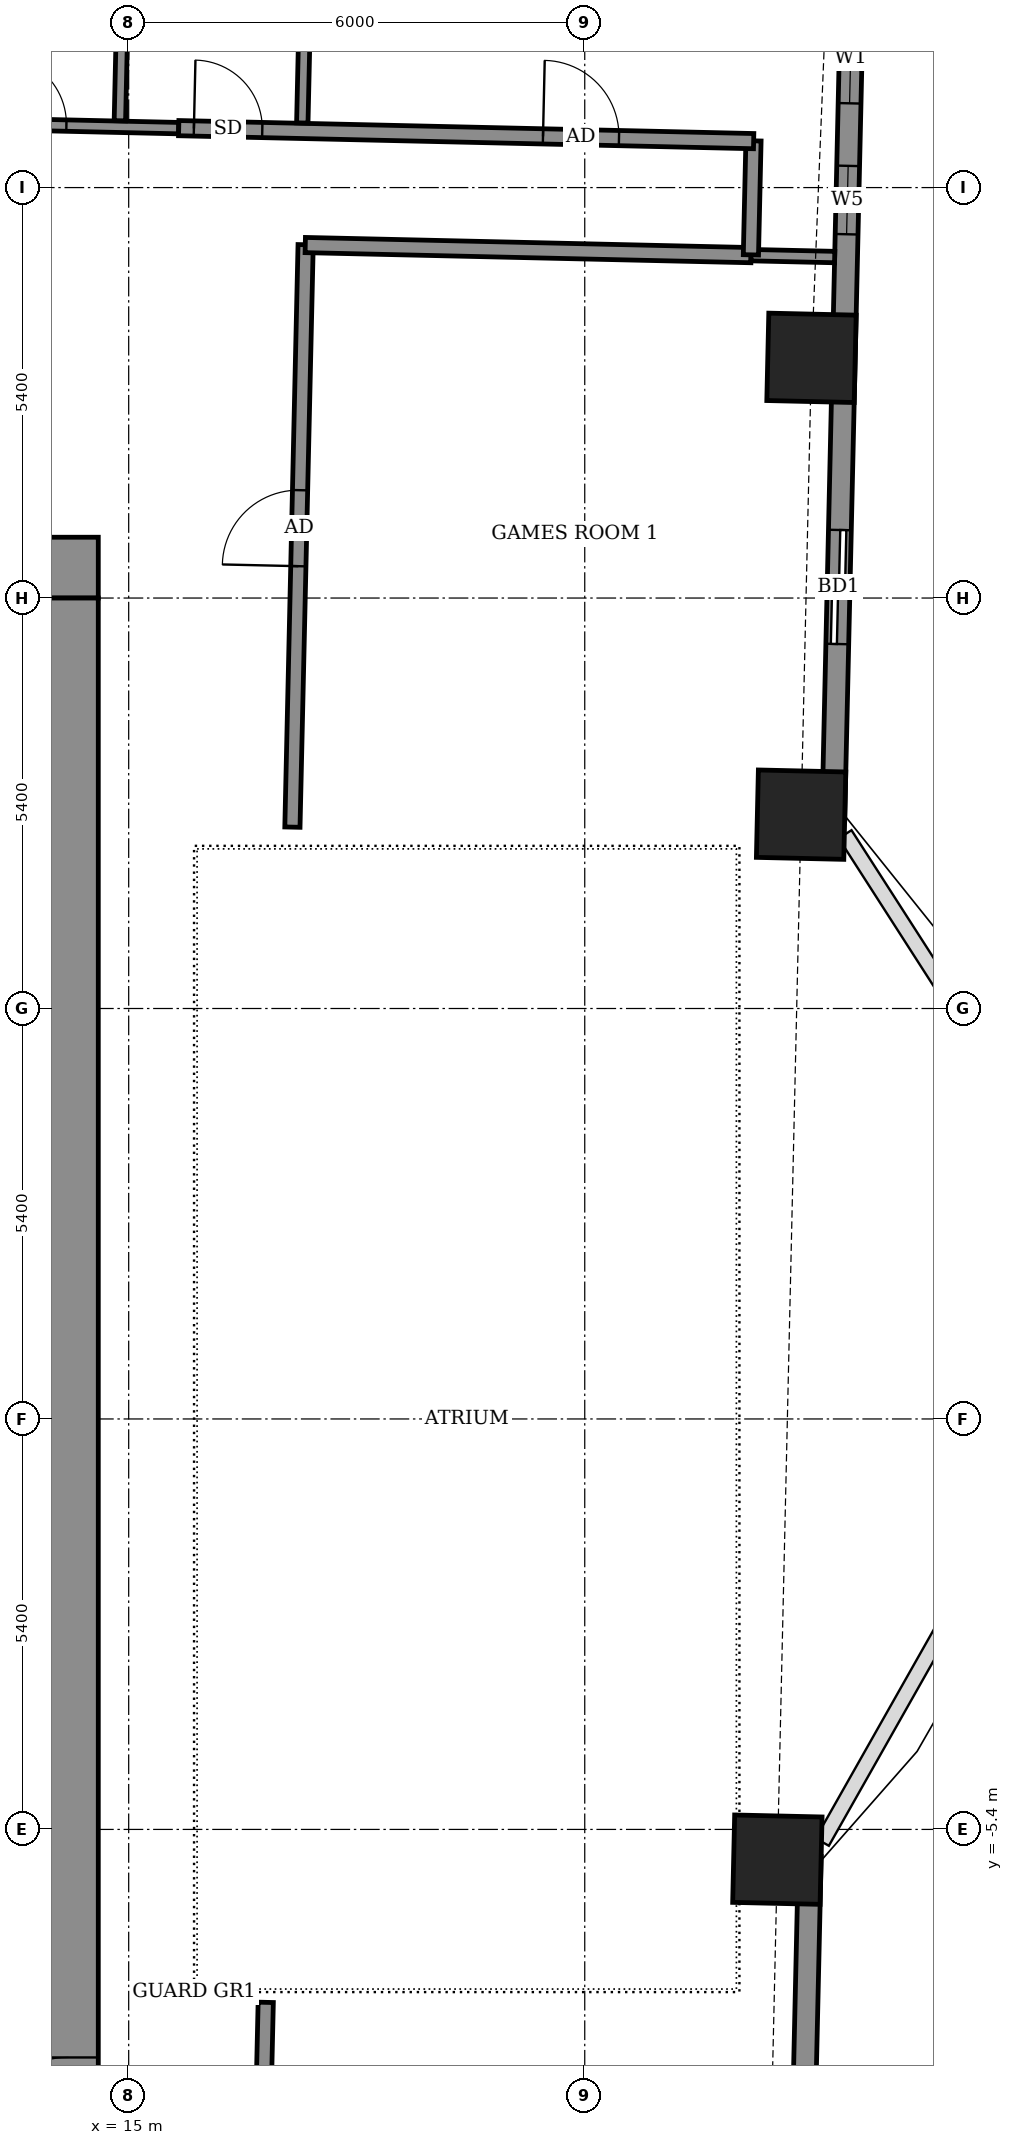
"""IFC4 building model, lengths in metres.
Left out: names, types, materials, properties, quantities, classifications, styles, units other than length and angle.
Written with IfcOpenShell. Run it as: python <this file> out.ifc"""

import sys

from ifc_helpers import new_model, si_unit, direction, frame, frame_2d, origin, origin_2d, place, context, subcontext, project, spatial, rectangle, extrude, element, fill, save


model = new_model("IFC4")
c1 = context("Model", 3, precision=1e-05, world=origin(), true_north=direction((0.0, 1.0)))
c2 = subcontext(c1, "Body", "Model", "MODEL_VIEW")
j1 = project(units=[si_unit("LENGTHUNIT", "METRE"), si_unit("PLANEANGLEUNIT", "RADIAN")], contexts=[c1])
p1 = place(None, origin())
s1 = spatial("IfcSite", under=j1, at=p1, CompositionType="ELEMENT")
p2 = place(p1, origin())
s2 = spatial("IfcBuilding", under=s1, at=p2, CompositionType="ELEMENT")
p3 = place(p2, frame((0.0, 0.0, 197.9)))
s3 = spatial("IfcBuildingStorey", under=s2, at=p3, CompositionType="ELEMENT", Elevation=197.9)
for number, where, z_axis, x_axis in (
    (1, (23.534, -5.798, -0.55), (0.0, 0.0, 1.0), (0.023, 1.0, 0.0)),
    (2, (23.846, 7.95, -0.55), (0.0, 0.0, 1.0), (0.023, 1.0, 0.0)),
    (3, (23.983, 13.96, -0.55), (0.0, 0.0, 1.0), (0.023, 1.0, 0.0)),
):
    element("IfcColumn", number, at=place(p3, frame(where, z_axis=z_axis, x_axis=x_axis)), inside=s3, PredefinedType="COLUMN", context=c2, shape_type="SweptSolid", body=[
        extrude(rectangle(XDim=1.15, YDim=1.15, at=origin_2d()), origin(), (0.0, 0.0, 1.0), 3.6),
    ])
p4 = place(p3, frame((23.713, -16.679, 0.0), z_axis=(0.0, 0.0, 1.0), x_axis=(0.02269451316, 0.999742446369, 0.0)))
e4 = element("IfcWall", 4, at=p4, inside=s3, PredefinedType="SOLIDWALL", context=c2, shape_type="SweptSolid", body=[
    extrude(rectangle(XDim=10.93, YDim=0.3, at=frame_2d((5.465, 0.0))), origin(), (0.0, 0.0, 1.0), 2.55),
])
p5 = place(p4, frame((1.454, 0.0, 0.0)))
e5 = element("IfcOpeningElement", 5, at=p5, cuts=e4, PredefinedType="OPENING", context=c2, shape_type="SweptSolid", body=[
    extrude(rectangle(XDim=1.5, YDim=2.4, at=frame_2d((0.75, 1.2))), frame((0.0, 0.16, 0.0), z_axis=(0.0, -1.0, 0.0), x_axis=(1.0, 0.0, 0.0)), (0.0, 0.0, 1.0), 0.32),
])
p6 = place(p4, frame((6.589, 0.0, 0.9)))
e6 = element("IfcOpeningElement", 6, at=p6, cuts=e4, PredefinedType="OPENING", context=c2, shape_type="SweptSolid", body=[
    extrude(rectangle(XDim=1.2, YDim=1.5, at=frame_2d((0.6, 0.75))), frame((0.0, 0.16, 0.0), z_axis=(0.0, -1.0, 0.0), x_axis=(1.0, 0.0, 0.0)), (0.0, 0.0, 1.0), 0.32),
])
p7 = place(p3, frame((24.27, 7.885, 0.0), z_axis=(0.0, 0.0, 1.0), x_axis=(0.022715362207, 0.999741972871, 0.0)))
e7 = element("IfcWall", 7, at=p7, inside=s3, PredefinedType="SOLIDWALL", context=c2, shape_type="SweptSolid", body=[
    extrude(rectangle(XDim=11.93, YDim=0.3, at=frame_2d((5.965, 0.0))), origin(), (0.0, 0.0, 1.0), 3.05),
])
p8 = place(p7, frame((2.311, 0.0, 0.0)))
e8 = element("IfcOpeningElement", 8, at=p8, cuts=e7, PredefinedType="OPENING", context=c2, shape_type="SweptSolid", body=[
    extrude(rectangle(XDim=1.5, YDim=2.4, at=frame_2d((0.75, 1.2))), frame((0.0, 0.16, 0.0), z_axis=(0.0, -1.0, 0.0), x_axis=(1.0, 0.0, 0.0)), (0.0, 0.0, 1.0), 0.32),
])
p9 = place(p7, frame((7.703, 0.0, 0.9)))
e9 = element("IfcOpeningElement", 9, at=p9, cuts=e7, PredefinedType="OPENING", context=c2, shape_type="SweptSolid", body=[
    extrude(rectangle(XDim=0.9, YDim=1.5, at=frame_2d((0.45, 0.75))), frame((0.0, 0.16, 0.0), z_axis=(0.0, -1.0, 0.0), x_axis=(1.0, 0.0, 0.0)), (0.0, 0.0, 1.0), 0.32),
])
p10 = place(p7, frame((9.426, 0.0, 0.9)))
e10 = element("IfcOpeningElement", 10, at=p10, cuts=e7, PredefinedType="OPENING", context=c2, shape_type="SweptSolid", body=[
    extrude(rectangle(XDim=1.2, YDim=1.5, at=frame_2d((0.6, 0.75))), frame((0.0, 0.16, 0.0), z_axis=(0.0, -1.0, 0.0), x_axis=(1.0, 0.0, 0.0)), (0.0, 0.0, 1.0), 0.32),
])
p11 = place(p3, frame((16.684, -12.919, 0.0), z_axis=(0.0, 0.0, 1.0), x_axis=(0.022667483124, 0.999743059595, 0.0)))
e11 = element("IfcWall", 11, at=p11, inside=s3, PredefinedType="PARTITIONING", context=c2, shape_type="SweptSolid", body=[
    extrude(rectangle(XDim=5.245, YDim=0.2, at=frame_2d((2.623, 0.0))), origin(), (0.0, 0.0, 1.0), 3.05),
])
p12 = place(p3, frame((17.154, 7.786, 0.0), z_axis=(0.0, 0.0, 1.0), x_axis=(0.022680883318, 0.999742755679, 0.0)))
e12 = element("IfcWall", 12, at=p12, inside=s3, PredefinedType="PARTITIONING", context=c2, shape_type="SweptSolid", body=[
    extrude(rectangle(XDim=7.664, YDim=0.2, at=frame_2d((3.832, 0.0))), origin(), (0.0, 0.0, 1.0), 3.05),
])
p13 = place(p12, frame((3.434, 0.0, 0.0)))
e13 = element("IfcOpeningElement", 13, at=p13, cuts=e12, PredefinedType="OPENING", context=c2, shape_type="SweptSolid", body=[
    extrude(rectangle(XDim=1.0, YDim=2.1, at=frame_2d((0.5, 1.05))), frame((0.0, 0.11, 0.0), z_axis=(0.0, -1.0, 0.0), x_axis=(1.0, 0.0, 0.0)), (0.0, 0.0, 1.0), 0.22),
])
p14 = place(p3, frame((17.323, 15.444, 0.0), z_axis=(0.0, 0.0, 1.0), x_axis=(0.999742758565, -0.022680756085, 0.0)))
e14 = element("IfcWall", 14, at=p14, inside=s3, PredefinedType="PARTITIONING", context=c2, shape_type="SweptSolid", body=[
    extrude(rectangle(XDim=5.866, YDim=0.2, at=frame_2d((2.933, 0.0))), origin(), (0.0, 0.0, 1.0), 3.05),
])
p15 = place(p3, frame((23.188, 15.311, 0.0), z_axis=(0.0, 0.0, 1.0), x_axis=(0.999738848859, -0.022852441507, 0.0)))
e15 = element("IfcWall", 15, at=p15, inside=s3, PredefinedType="PARTITIONING", context=c2, shape_type="SweptSolid", body=[
    extrude(rectangle(XDim=1.1, YDim=0.15, at=frame_2d((0.55, 0.0))), origin(), (0.0, 0.0, 1.0), 2.55),
])
p16 = place(p3, frame((23.186, 15.315, 0.0), z_axis=(0.0, 0.0, 1.0), x_axis=(0.022617910375, 0.999744182344, 0.0)))
e16 = element("IfcWall", 16, at=p16, inside=s3, PredefinedType="PARTITIONING", context=c2, shape_type="SweptSolid", body=[
    extrude(rectangle(XDim=1.5, YDim=0.2, at=frame_2d((0.75, 0.0))), origin(), (0.0, 0.0, 1.0), 3.05),
])
p17 = place(p3, frame((-14.871, 17.675, 0.0), z_axis=(0.0, 0.0, 1.0), x_axis=(0.999742359486, -0.02269834024, 0.0)))
e17 = element("IfcWall", 17, at=p17, inside=s3, PredefinedType="PARTITIONING", context=c2, shape_type="SweptSolid", body=[
    extrude(rectangle(XDim=30.536, YDim=0.15, at=frame_2d((15.268, 0.0))), origin(), (0.0, 0.0, 1.0), 3.05),
])
p18 = place(p17, frame((28.159, 0.0, 0.0)))
e18 = element("IfcOpeningElement", 18, at=p18, cuts=e17, PredefinedType="OPENING", context=c2, shape_type="SweptSolid", body=[
    extrude(rectangle(XDim=0.9, YDim=2.1, at=frame_2d((0.45, 1.05))), frame((0.0, 0.085, 0.0), z_axis=(0.0, -1.0, 0.0), x_axis=(1.0, 0.0, 0.0)), (0.0, 0.0, 1.0), 0.17),
])
p19 = place(p17, frame((21.034, 0.0, 0.0)))
e19 = element("IfcOpeningElement", 19, at=p19, cuts=e17, PredefinedType="OPENING", context=c2, shape_type="SweptSolid", body=[
    extrude(rectangle(XDim=0.9, YDim=2.1, at=frame_2d((0.45, 1.05))), frame((0.0, 0.085, 0.0), z_axis=(0.0, -1.0, 0.0), x_axis=(1.0, 0.0, 0.0)), (0.0, 0.0, 1.0), 0.17),
])
p20 = place(p17, frame((18.684, 0.0, 0.0)))
e20 = element("IfcOpeningElement", 20, at=p20, cuts=e17, PredefinedType="OPENING", context=c2, shape_type="SweptSolid", body=[
    extrude(rectangle(XDim=0.9, YDim=2.1, at=frame_2d((0.45, 1.05))), frame((0.0, 0.085, 0.0), z_axis=(0.0, -1.0, 0.0), x_axis=(1.0, 0.0, 0.0)), (0.0, 0.0, 1.0), 0.17),
])
p21 = place(p17, frame((11.709, 0.0, 0.0)))
e21 = element("IfcOpeningElement", 21, at=p21, cuts=e17, PredefinedType="OPENING", context=c2, shape_type="SweptSolid", body=[
    extrude(rectangle(XDim=0.9, YDim=2.1, at=frame_2d((0.45, 1.05))), frame((0.0, 0.085, 0.0), z_axis=(0.0, -1.0, 0.0), x_axis=(1.0, 0.0, 0.0)), (0.0, 0.0, 1.0), 0.17),
])
p22 = place(p17, frame((9.734, 0.0, 0.0)))
e22 = element("IfcOpeningElement", 22, at=p22, cuts=e17, PredefinedType="OPENING", context=c2, shape_type="SweptSolid", body=[
    extrude(rectangle(XDim=0.9, YDim=2.1, at=frame_2d((0.45, 1.05))), frame((0.0, 0.085, 0.0), z_axis=(0.0, -1.0, 0.0), x_axis=(1.0, 0.0, 0.0)), (0.0, 0.0, 1.0), 0.17),
])
p23 = place(p17, frame((2.859, 0.0, 0.0)))
e23 = element("IfcOpeningElement", 23, at=p23, cuts=e17, PredefinedType="OPENING", context=c2, shape_type="SweptSolid", body=[
    extrude(rectangle(XDim=0.9, YDim=2.1, at=frame_2d((0.45, 1.05))), frame((0.0, 0.085, 0.0), z_axis=(0.0, -1.0, 0.0), x_axis=(1.0, 0.0, 0.0)), (0.0, 0.0, 1.0), 0.17),
])
p24 = place(p17, frame((0.584, 0.0, 0.0)))
e24 = element("IfcOpeningElement", 24, at=p24, cuts=e17, PredefinedType="OPENING", context=c2, shape_type="SweptSolid", body=[
    extrude(rectangle(XDim=0.9, YDim=2.1, at=frame_2d((0.45, 1.05))), frame((0.0, 0.085, 0.0), z_axis=(0.0, -1.0, 0.0), x_axis=(1.0, 0.0, 0.0)), (0.0, 0.0, 1.0), 0.17),
])
p25 = place(p3, frame((15.658, 16.982, 0.0), z_axis=(0.0, 0.0, 1.0), x_axis=(0.99974485859, -0.022587999516, 0.0)))
e25 = element("IfcWall", 25, at=p25, inside=s3, PredefinedType="PARTITIONING", context=c2, shape_type="SweptSolid", body=[
    extrude(rectangle(XDim=7.566, YDim=0.2, at=frame_2d((3.783, 0.0))), origin(), (0.0, 0.0, 1.0), 3.05),
])
p26 = place(p25, frame((4.794, 0.0, 0.0)))
e26 = element("IfcOpeningElement", 26, at=p26, cuts=e25, PredefinedType="OPENING", context=c2, shape_type="SweptSolid", body=[
    extrude(rectangle(XDim=1.0, YDim=2.1, at=frame_2d((0.5, 1.05))), frame((0.0, 0.11, 0.0), z_axis=(0.0, -1.0, 0.0), x_axis=(1.0, 0.0, 0.0)), (0.0, 0.0, 1.0), 0.22),
])
p27 = place(p25, frame((0.2, 0.0, 0.0)))
e27 = element("IfcOpeningElement", 27, at=p27, cuts=e25, PredefinedType="OPENING", context=c2, shape_type="SweptSolid", body=[
    extrude(rectangle(XDim=0.9, YDim=2.1, at=frame_2d((0.45, 1.05))), frame((0.0, 0.11, 0.0), z_axis=(0.0, -1.0, 0.0), x_axis=(1.0, 0.0, 0.0)), (0.0, 0.0, 1.0), 0.22),
])
p28 = place(p3, frame((14.884, 17.079, 0.0), z_axis=(0.0, 0.0, 1.0), x_axis=(0.022703185001, 0.999742249478, 0.0)))
e28 = element("IfcWall", 28, at=p28, inside=s3, PredefinedType="PARTITIONING", context=c2, shape_type="SweptSolid", body=[
    extrude(rectangle(XDim=7.0, YDim=0.15, at=frame_2d((3.5, 0.0))), origin(), (0.0, 0.0, 1.0), 2.55),
])
p29 = place(p3, frame((17.284, 17.05, 0.0), z_axis=(0.0, 0.0, 1.0), x_axis=(0.02260842146, 0.999744396973, 0.0)))
e29 = element("IfcWall", 29, at=p29, inside=s3, PredefinedType="PARTITIONING", context=c2, shape_type="SweptSolid", body=[
    extrude(rectangle(XDim=2.7, YDim=0.15, at=frame_2d((1.35, 0.0))), origin(), (0.0, 0.0, 1.0), 3.05),
])
p30 = place(p3, frame((-14.6, 11.2, 0.0), z_axis=(0.0, 0.0, 1.0), x_axis=(1.0, 0.0, 0.0)))
e30 = element("IfcWall", 30, at=p30, inside=s3, PredefinedType="SHEAR", context=c2, shape_type="SweptSolid", body=[
    extrude(rectangle(XDim=29.2, YDim=0.8, at=frame_2d((14.6, 0.0))), origin(), (0.0, 0.0, 1.0), 3.6),
])
p31 = place(p3, frame((14.2, -10.8, 0.0), z_axis=(0.0, 0.0, 1.0), x_axis=(0.0, 1.0, 0.0)))
e31 = element("IfcWall", 31, at=p31, inside=s3, PredefinedType="SHEAR", context=c2, shape_type="SweptSolid", body=[
    extrude(rectangle(XDim=21.6, YDim=0.8, at=frame_2d((10.8, 0.0))), origin(), (0.0, 0.0, 1.0), 3.6),
])
p32 = place(p31, frame((1.2, 0.0, 0.0)))
e32 = element("IfcOpeningElement", 32, at=p32, cuts=e31, PredefinedType="OPENING", context=c2, shape_type="SweptSolid", body=[
    extrude(rectangle(XDim=1.2, YDim=2.1, at=frame_2d((0.6, 1.05))), frame((0.0, 0.41, 0.0), z_axis=(0.0, -1.0, 0.0), x_axis=(1.0, 0.0, 0.0)), (0.0, 0.0, 1.0), 0.82),
])
p33 = place(p8, origin())
e33 = element("IfcDoor", 33, at=p33, inside=s3, OperationType="SLIDING_TO_LEFT", PredefinedType="DOOR", context=c2, shape_type="SweptSolid", body=[
    extrude(rectangle(XDim=1.5, YDim=2.4, at=frame_2d((0.75, 1.2))), frame((0.0, 0.025, 0.0), z_axis=(0.0, -1.0, 0.0), x_axis=(1.0, 0.0, 0.0)), (0.0, 0.0, 1.0), 0.05),
])
fill(e8, e33)
p34 = place(p9, origin())
e34 = element("IfcWindow", 34, at=p34, inside=s3, PartitioningType="SINGLE_PANEL", PredefinedType="WINDOW", context=c2, shape_type="SweptSolid", body=[
    extrude(rectangle(XDim=0.9, YDim=1.5, at=frame_2d((0.45, 0.75))), frame((0.0, 0.03, 0.0), z_axis=(0.0, -1.0, 0.0), x_axis=(1.0, 0.0, 0.0)), (0.0, 0.0, 1.0), 0.06),
])
fill(e9, e34)
p35 = place(p10, origin())
e35 = element("IfcWindow", 35, at=p35, inside=s3, PartitioningType="SINGLE_PANEL", PredefinedType="WINDOW", context=c2, shape_type="SweptSolid", body=[
    extrude(rectangle(XDim=1.2, YDim=1.5, at=frame_2d((0.6, 0.75))), frame((0.0, 0.03, 0.0), z_axis=(0.0, -1.0, 0.0), x_axis=(1.0, 0.0, 0.0)), (0.0, 0.0, 1.0), 0.06),
])
fill(e10, e35)
p36 = place(p13, origin())
e36 = element("IfcDoor", 36, at=p36, inside=s3, OperationType="SINGLE_SWING_RIGHT", PredefinedType="DOOR", context=c2, shape_type="SweptSolid", body=[
    extrude(rectangle(XDim=1.0, YDim=2.1, at=frame_2d((0.5, 1.05))), frame((0.0, 0.025, 0.0), z_axis=(0.0, -1.0, 0.0), x_axis=(1.0, 0.0, 0.0)), (0.0, 0.0, 1.0), 0.05),
])
fill(e13, e36)
p37 = place(p26, origin())
e37 = element("IfcDoor", 37, at=p37, inside=s3, OperationType="SINGLE_SWING_LEFT", PredefinedType="DOOR", context=c2, shape_type="SweptSolid", body=[
    extrude(rectangle(XDim=1.0, YDim=2.1, at=frame_2d((0.5, 1.05))), frame((0.0, 0.025, 0.0), z_axis=(0.0, -1.0, 0.0), x_axis=(1.0, 0.0, 0.0)), (0.0, 0.0, 1.0), 0.05),
])
fill(e26, e37)
p38 = place(p27, origin())
e38 = element("IfcDoor", 38, at=p38, inside=s3, OperationType="SINGLE_SWING_LEFT", PredefinedType="DOOR", context=c2, shape_type="SweptSolid", body=[
    extrude(rectangle(XDim=0.9, YDim=2.1, at=frame_2d((0.45, 1.05))), frame((0.0, 0.025, 0.0), z_axis=(0.0, -1.0, 0.0), x_axis=(1.0, 0.0, 0.0)), (0.0, 0.0, 1.0), 0.05),
])
fill(e27, e38)
p39 = place(p18, origin())
e39 = element("IfcDoor", 39, at=p39, inside=s3, OperationType="SINGLE_SWING_RIGHT", PredefinedType="DOOR", context=c2, shape_type="SweptSolid", body=[
    extrude(rectangle(XDim=0.9, YDim=2.1, at=frame_2d((0.45, 1.05))), frame((0.0, 0.025, 0.0), z_axis=(0.0, -1.0, 0.0), x_axis=(1.0, 0.0, 0.0)), (0.0, 0.0, 1.0), 0.05),
])
fill(e18, e39)
p40 = place(p32, origin())
e40 = element("IfcDoor", 40, at=p40, inside=s3, OperationType="DOUBLE_DOOR_SINGLE_SWING", PredefinedType="DOOR", context=c2, shape_type="SweptSolid", body=[
    extrude(rectangle(XDim=1.2, YDim=2.1, at=frame_2d((0.6, 1.05))), frame((0.0, 0.025, 0.0), z_axis=(0.0, -1.0, 0.0), x_axis=(1.0, 0.0, 0.0)), (0.0, 0.0, 1.0), 0.05),
])
fill(e32, e40)
save(model, sys.argv[1])
